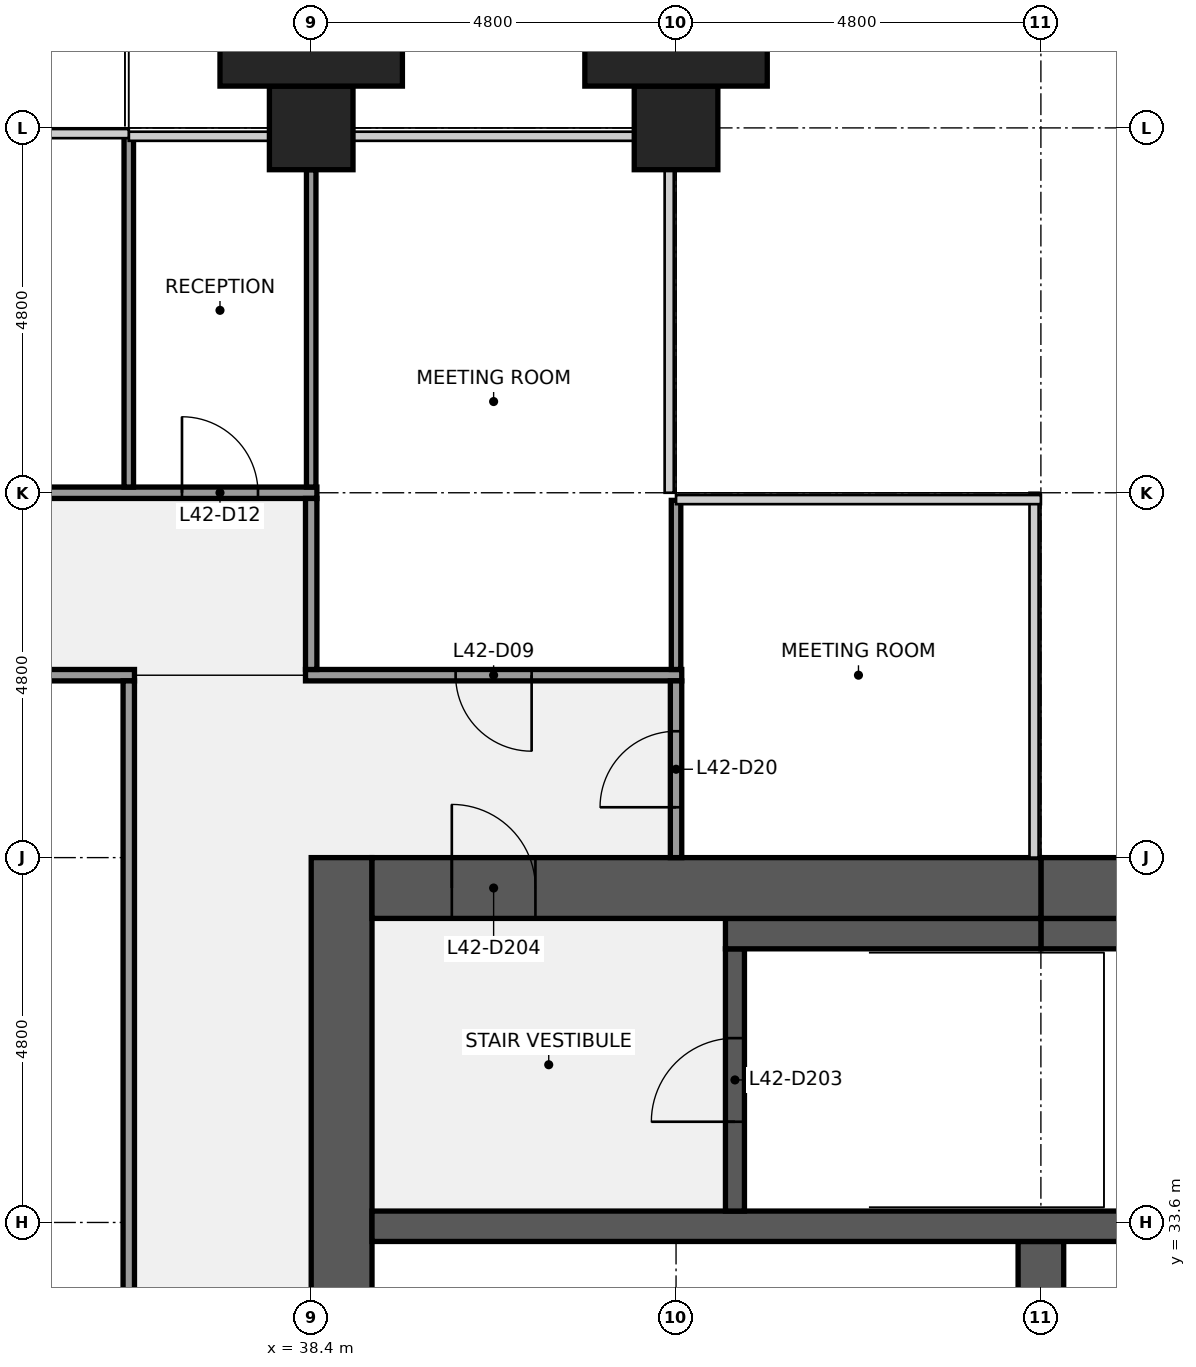
"""IFC4 building model, lengths in metres.
Left out: names, types, materials, properties, quantities, classifications, styles, units other than length and angle.
Written with IfcOpenShell. Run it as: python <this file> out.ifc"""

import sys

from ifc_helpers import new_model, si_unit, direction, frame, frame_2d, origin, origin_2d, place, context, subcontext, project, spatial, rectangle, extrude, element, fill, save


model = new_model("IFC4")
c1 = context("Model", 3, precision=1e-05, world=origin(), true_north=direction((0.0, 1.0)))
c2 = subcontext(c1, "Body", "Model", "MODEL_VIEW")
j1 = project(units=[si_unit("LENGTHUNIT", "METRE"), si_unit("PLANEANGLEUNIT", "RADIAN")], contexts=[c1])
p1 = place(None, origin())
s1 = spatial("IfcSite", under=j1, at=p1, CompositionType="ELEMENT")
p2 = place(p1, origin())
s2 = spatial("IfcBuilding", under=s1, at=p2, CompositionType="ELEMENT")
p3 = place(p2, frame((0.0, 0.0, 197.2)))
s3 = spatial("IfcBuildingStorey", under=s2, at=p3, CompositionType="ELEMENT", Elevation=197.2)
for number, where, z_axis, x_axis in (
    (1, (38.4, 48.0, 0.0), (0.0, 0.0, 1.0), (1.0, 0.0, 0.0)),
    (2, (43.2, 48.0, 0.0), (0.0, 0.0, 1.0), (1.0, 0.0, 0.0)),
):
    element("IfcColumn", number, at=place(p3, frame(where, z_axis=z_axis, x_axis=x_axis)), inside=s3, PredefinedType="COLUMN", context=c2, shape_type="SweptSolid", body=[
        extrude(rectangle(XDim=1.1, YDim=1.1, at=origin_2d()), origin(), (0.0, 0.0, 1.0), 4.0),
    ])
p4 = place(p3, frame((38.8, 9.6, 0.0), z_axis=(0.0, 0.0, 1.0), x_axis=(0.0, 1.0, 0.0)))
e3 = element("IfcWall", 3, at=p4, inside=s3, PredefinedType="SHEAR", context=c2, shape_type="SweptSolid", body=[
    extrude(rectangle(XDim=28.8, YDim=0.8, at=frame_2d((14.4, 0.0))), origin(), (0.0, 0.0, 1.0), 3.84),
])
p5 = place(p4, frame((8.7, 0.0, 0.0)))
e4 = element("IfcOpeningElement", 4, at=p5, cuts=e3, PredefinedType="OPENING", context=c2, shape_type="SweptSolid", body=[
    extrude(rectangle(XDim=1.8, YDim=2.1, at=frame_2d((0.9, 1.05))), frame((0.0, 0.41, 0.0), z_axis=(0.0, -1.0, 0.0), x_axis=(1.0, 0.0, 0.0)), (0.0, 0.0, 1.0), 0.82),
])
p6 = place(p4, frame((18.3, 0.0, 0.0)))
e5 = element("IfcOpeningElement", 5, at=p6, cuts=e3, PredefinedType="OPENING", context=c2, shape_type="SweptSolid", body=[
    extrude(rectangle(XDim=1.8, YDim=2.1, at=frame_2d((0.9, 1.05))), frame((0.0, 0.41, 0.0), z_axis=(0.0, -1.0, 0.0), x_axis=(1.0, 0.0, 0.0)), (0.0, 0.0, 1.0), 0.82),
])
p7 = place(p3, frame((48.0, 30.75, 0.0), z_axis=(0.0, 0.0, 1.0), x_axis=(0.0, 1.0, 0.0)))
e6 = element("IfcWall", 6, at=p7, inside=s3, PredefinedType="SHEAR", context=c2, shape_type="SweptSolid", body=[
    extrude(rectangle(XDim=2.6, YDim=0.6, at=frame_2d((1.3, 0.0))), origin(), (0.0, 0.0, 1.0), 3.84),
])
p8 = place(p3, frame((39.2, 33.55, 0.0), z_axis=(0.0, 0.0, 1.0), x_axis=(1.0, 0.0, 0.0)))
e7 = element("IfcWall", 7, at=p8, inside=s3, PredefinedType="SHEAR", context=c2, shape_type="SweptSolid", body=[
    extrude(rectangle(XDim=17.6, YDim=0.4, at=frame_2d((8.8, 0.0))), origin(), (0.0, 0.0, 1.0), 3.84),
])
p9 = place(p3, frame((43.975, 33.75, 0.0), z_axis=(0.0, 0.0, 1.0), x_axis=(0.0, 1.0, 0.0)))
e8 = element("IfcWall", 8, at=p9, inside=s3, PredefinedType="SHEAR", context=c2, shape_type="SweptSolid", body=[
    extrude(rectangle(XDim=3.45, YDim=0.25, at=frame_2d((1.725, 0.0))), origin(), (0.0, 0.0, 1.0), 3.84),
])
p10 = place(p9, frame((1.175, 0.0, 0.0)))
e9 = element("IfcOpeningElement", 9, at=p10, cuts=e8, PredefinedType="OPENING", context=c2, shape_type="SweptSolid", body=[
    extrude(rectangle(XDim=1.1, YDim=2.1, at=frame_2d((0.55, 1.05))), frame((0.0, 0.135, 0.0), z_axis=(0.0, -1.0, 0.0), x_axis=(1.0, 0.0, 0.0)), (0.0, 0.0, 1.0), 0.27),
])
p11 = place(p3, frame((48.0, 37.4, 0.0), z_axis=(0.0, 0.0, 1.0), x_axis=(1.0, 0.0, 0.0)))
e10 = element("IfcWall", 10, at=p11, inside=s3, PredefinedType="SHEAR", context=c2, shape_type="SweptSolid", body=[
    extrude(rectangle(XDim=3.35, YDim=0.4, at=frame_2d((1.675, 0.0))), origin(), (0.0, 0.0, 1.0), 3.84),
])
p12 = place(p3, frame((43.85, 37.4, 0.0), z_axis=(0.0, 0.0, 1.0), x_axis=(1.0, 0.0, 0.0)))
e11 = element("IfcWall", 11, at=p12, inside=s3, PredefinedType="SHEAR", context=c2, shape_type="SweptSolid", body=[
    extrude(rectangle(XDim=4.15, YDim=0.4, at=frame_2d((2.075, 0.0))), origin(), (0.0, 0.0, 1.0), 3.84),
])
p13 = place(p3, frame((48.0, 38.0, 0.0), z_axis=(0.0, 0.0, 1.0), x_axis=(1.0, 0.0, 0.0)))
e12 = element("IfcWall", 12, at=p13, inside=s3, PredefinedType="SHEAR", context=c2, shape_type="SweptSolid", body=[
    extrude(rectangle(XDim=8.8, YDim=0.8, at=frame_2d((4.4, 0.0))), origin(), (0.0, 0.0, 1.0), 3.84),
])
p14 = place(p13, frame((1.5, 0.0, 0.9)))
e13 = element("IfcOpeningElement", 13, at=p14, cuts=e12, PredefinedType="OPENING", context=c2, shape_type="SweptSolid", body=[
    extrude(rectangle(XDim=1.8, YDim=1.5, at=frame_2d((0.9, 0.75))), frame((0.0, 0.41, 0.0), z_axis=(0.0, -1.0, 0.0), x_axis=(1.0, 0.0, 0.0)), (0.0, 0.0, 1.0), 0.82),
])
p15 = place(p3, frame((39.2, 38.0, 0.0), z_axis=(0.0, 0.0, 1.0), x_axis=(1.0, 0.0, 0.0)))
e14 = element("IfcWall", 14, at=p15, inside=s3, PredefinedType="SHEAR", context=c2, shape_type="SweptSolid", body=[
    extrude(rectangle(XDim=8.8, YDim=0.8, at=frame_2d((4.4, 0.0))), origin(), (0.0, 0.0, 1.0), 3.84),
])
p16 = place(p15, frame((1.05, 0.0, 0.0)))
e15 = element("IfcOpeningElement", 15, at=p16, cuts=e14, PredefinedType="OPENING", context=c2, shape_type="SweptSolid", body=[
    extrude(rectangle(XDim=1.1, YDim=2.1, at=frame_2d((0.55, 1.05))), frame((0.0, 0.41, 0.0), z_axis=(0.0, -1.0, 0.0), x_axis=(1.0, 0.0, 0.0)), (0.0, 0.0, 1.0), 0.82),
])
p17 = place(p3, frame((21.525, 40.8, 0.0), z_axis=(0.0, 0.0, 1.0), x_axis=(1.0, 0.0, 0.0)))
e16 = element("IfcWall", 16, at=p17, inside=s3, PredefinedType="PARTITIONING", context=c2, shape_type="SweptSolid", body=[
    extrude(rectangle(XDim=14.55, YDim=0.15, at=frame_2d((7.275, 0.0))), origin(), (0.0, 0.0, 1.0), 2.87),
])
p18 = place(p3, frame((38.325, 40.8, 0.0), z_axis=(0.0, 0.0, 1.0), x_axis=(1.0, 0.0, 0.0)))
e17 = element("IfcWall", 17, at=p18, inside=s3, PredefinedType="PARTITIONING", context=c2, shape_type="SweptSolid", body=[
    extrude(rectangle(XDim=4.95, YDim=0.15, at=frame_2d((2.475, 0.0))), origin(), (0.0, 0.0, 1.0), 2.87),
])
p19 = place(p18, frame((1.975, 0.0, 0.0)))
e18 = element("IfcOpeningElement", 18, at=p19, cuts=e17, PredefinedType="OPENING", context=c2, shape_type="SweptSolid", body=[
    extrude(rectangle(XDim=1.0, YDim=2.1, at=frame_2d((0.5, 1.05))), frame((0.0, 0.085, 0.0), z_axis=(0.0, -1.0, 0.0), x_axis=(1.0, 0.0, 0.0)), (0.0, 0.0, 1.0), 0.17),
])
p20 = place(p3, frame((19.125, 43.2, 0.0), z_axis=(0.0, 0.0, 1.0), x_axis=(1.0, 0.0, 0.0)))
e19 = element("IfcWall", 19, at=p20, inside=s3, PredefinedType="PARTITIONING", context=c2, shape_type="SweptSolid", body=[
    extrude(rectangle(XDim=19.35, YDim=0.15, at=frame_2d((9.675, 0.0))), origin(), (0.0, 0.0, 1.0), 2.87),
])
p21 = place(p20, frame((5.575, 0.0, 0.0)))
e20 = element("IfcOpeningElement", 20, at=p21, cuts=e19, PredefinedType="OPENING", context=c2, shape_type="SweptSolid", body=[
    extrude(rectangle(XDim=1.0, YDim=2.1, at=frame_2d((0.5, 1.05))), frame((0.0, 0.085, 0.0), z_axis=(0.0, -1.0, 0.0), x_axis=(1.0, 0.0, 0.0)), (0.0, 0.0, 1.0), 0.17),
])
p22 = place(p20, frame((13.975, 0.0, 0.0)))
e21 = element("IfcOpeningElement", 21, at=p22, cuts=e19, PredefinedType="OPENING", context=c2, shape_type="SweptSolid", body=[
    extrude(rectangle(XDim=1.0, YDim=2.1, at=frame_2d((0.5, 1.05))), frame((0.0, 0.085, 0.0), z_axis=(0.0, -1.0, 0.0), x_axis=(1.0, 0.0, 0.0)), (0.0, 0.0, 1.0), 0.17),
])
p23 = place(p20, frame((17.575, 0.0, 0.0)))
e22 = element("IfcOpeningElement", 22, at=p23, cuts=e19, PredefinedType="OPENING", context=c2, shape_type="SweptSolid", body=[
    extrude(rectangle(XDim=1.0, YDim=2.1, at=frame_2d((0.5, 1.05))), frame((0.0, 0.085, 0.0), z_axis=(0.0, -1.0, 0.0), x_axis=(1.0, 0.0, 0.0)), (0.0, 0.0, 1.0), 0.17),
])
p24 = place(p3, frame((36.0, 43.275, 0.0), z_axis=(0.0, 0.0, 1.0), x_axis=(0.0, 1.0, 0.0)))
e23 = element("IfcWall", 23, at=p24, inside=s3, PredefinedType="PARTITIONING", context=c2, shape_type="SweptSolid", body=[
    extrude(rectangle(XDim=4.625, YDim=0.125, at=frame_2d((2.312, 0.0))), origin(), (0.0, 0.0, 1.0), 2.87),
])
p25 = place(p3, frame((36.0, 21.663, 0.0), z_axis=(0.0, 0.0, 1.0), x_axis=(0.0, 1.0, 0.0)))
e24 = element("IfcWall", 24, at=p25, inside=s3, PredefinedType="PARTITIONING", context=c2, shape_type="SweptSolid", body=[
    extrude(rectangle(XDim=19.062, YDim=0.15, at=frame_2d((9.531, 0.0))), origin(), (0.0, 0.0, 1.0), 2.87),
])
p26 = place(p25, frame((9.031, 0.0, 0.0)))
e25 = element("IfcOpeningElement", 25, at=p26, cuts=e24, PredefinedType="OPENING", context=c2, shape_type="SweptSolid", body=[
    extrude(rectangle(XDim=1.0, YDim=2.1, at=frame_2d((0.5, 1.05))), frame((0.0, 0.085, 0.0), z_axis=(0.0, -1.0, 0.0), x_axis=(1.0, 0.0, 0.0)), (0.0, 0.0, 1.0), 0.17),
])
p27 = place(p3, frame((38.4, 43.275, 0.0), z_axis=(0.0, 0.0, 1.0), x_axis=(0.0, 1.0, 0.0)))
e26 = element("IfcWall", 26, at=p27, inside=s3, PredefinedType="PARTITIONING", context=c2, shape_type="SweptSolid", body=[
    extrude(rectangle(XDim=4.175, YDim=0.125, at=frame_2d((2.087, 0.0))), origin(), (0.0, 0.0, 1.0), 2.87),
])
p28 = place(p3, frame((38.4, 40.875, 0.0), z_axis=(0.0, 0.0, 1.0), x_axis=(0.0, 1.0, 0.0)))
e27 = element("IfcWall", 27, at=p28, inside=s3, PredefinedType="PARTITIONING", context=c2, shape_type="SweptSolid", body=[
    extrude(rectangle(XDim=2.25, YDim=0.15, at=frame_2d((1.125, 0.0))), origin(), (0.0, 0.0, 1.0), 2.87),
])
p29 = place(p3, frame((43.2, 40.875, 0.0), z_axis=(0.0, 0.0, 1.0), x_axis=(0.0, 1.0, 0.0)))
e28 = element("IfcWall", 28, at=p29, inside=s3, PredefinedType="PARTITIONING", context=c2, shape_type="SweptSolid", body=[
    extrude(rectangle(XDim=2.225, YDim=0.125, at=frame_2d((1.113, 0.0))), origin(), (0.0, 0.0, 1.0), 2.87),
])
p30 = place(p3, frame((43.2, 38.4, 0.0), z_axis=(0.0, 0.0, 1.0), x_axis=(0.0, 1.0, 0.0)))
e29 = element("IfcWall", 29, at=p30, inside=s3, PredefinedType="PARTITIONING", context=c2, shape_type="SweptSolid", body=[
    extrude(rectangle(XDim=2.325, YDim=0.15, at=frame_2d((1.163, 0.0))), origin(), (0.0, 0.0, 1.0), 2.87),
])
p31 = place(p30, frame((0.663, 0.0, 0.0)))
e30 = element("IfcOpeningElement", 30, at=p31, cuts=e29, PredefinedType="OPENING", context=c2, shape_type="SweptSolid", body=[
    extrude(rectangle(XDim=1.0, YDim=2.1, at=frame_2d((0.5, 1.05))), frame((0.0, 0.085, 0.0), z_axis=(0.0, -1.0, 0.0), x_axis=(1.0, 0.0, 0.0)), (0.0, 0.0, 1.0), 0.17),
])
for number, where, z_axis, x_axis in (
    (31, (38.4, 49.025, 0.0), (0.0, 0.0, 1.0), (1.0, 0.0, 0.0)),
    (32, (43.2, 49.025, 0.0), (0.0, 0.0, 1.0), (1.0, 0.0, 0.0)),
):
    element("IfcColumn", number, at=place(p3, frame(where, z_axis=z_axis, x_axis=x_axis)), inside=s3, PredefinedType="PILASTER", context=c2, shape_type="SweptSolid", body=[
        extrude(rectangle(XDim=2.4, YDim=0.95, at=origin_2d()), origin(), (0.0, 0.0, 1.0), 4.0),
    ])
p32 = place(p10, origin())
e33 = element("IfcDoor", 33, at=p32, inside=s3, OperationType="SINGLE_SWING_LEFT", PredefinedType="DOOR", context=c2, shape_type="SweptSolid", body=[
    extrude(rectangle(XDim=1.1, YDim=2.1, at=frame_2d((0.55, 1.05))), frame((0.0, 0.025, 0.0), z_axis=(0.0, -1.0, 0.0), x_axis=(1.0, 0.0, 0.0)), (0.0, 0.0, 1.0), 0.05),
])
fill(e9, e33)
p33 = place(p16, origin())
e34 = element("IfcDoor", 34, at=p33, inside=s3, OperationType="SINGLE_SWING_LEFT", PredefinedType="DOOR", context=c2, shape_type="SweptSolid", body=[
    extrude(rectangle(XDim=1.1, YDim=2.1, at=frame_2d((0.55, 1.05))), frame((0.0, 0.025, 0.0), z_axis=(0.0, -1.0, 0.0), x_axis=(1.0, 0.0, 0.0)), (0.0, 0.0, 1.0), 0.05),
])
fill(e15, e34)
p34 = place(p19, origin())
e35 = element("IfcDoor", 35, at=p34, inside=s3, OperationType="SINGLE_SWING_RIGHT", PredefinedType="DOOR", context=c2, shape_type="SweptSolid", body=[
    extrude(rectangle(XDim=1.0, YDim=2.1, at=frame_2d((0.5, 1.05))), frame((0.0, 0.025, 0.0), z_axis=(0.0, -1.0, 0.0), x_axis=(1.0, 0.0, 0.0)), (0.0, 0.0, 1.0), 0.05),
])
fill(e18, e35)
p35 = place(p23, origin())
e36 = element("IfcDoor", 36, at=p35, inside=s3, OperationType="SINGLE_SWING_LEFT", PredefinedType="DOOR", context=c2, shape_type="SweptSolid", body=[
    extrude(rectangle(XDim=1.0, YDim=2.1, at=frame_2d((0.5, 1.05))), frame((0.0, 0.025, 0.0), z_axis=(0.0, -1.0, 0.0), x_axis=(1.0, 0.0, 0.0)), (0.0, 0.0, 1.0), 0.05),
])
fill(e22, e36)
p36 = place(p31, origin())
e37 = element("IfcDoor", 37, at=p36, inside=s3, OperationType="SINGLE_SWING_LEFT", PredefinedType="DOOR", context=c2, shape_type="SweptSolid", body=[
    extrude(rectangle(XDim=1.0, YDim=2.1, at=frame_2d((0.5, 1.05))), frame((0.0, 0.025, 0.0), z_axis=(0.0, -1.0, 0.0), x_axis=(1.0, 0.0, 0.0)), (0.0, 0.0, 1.0), 0.05),
])
fill(e30, e37)
save(model, sys.argv[1])
